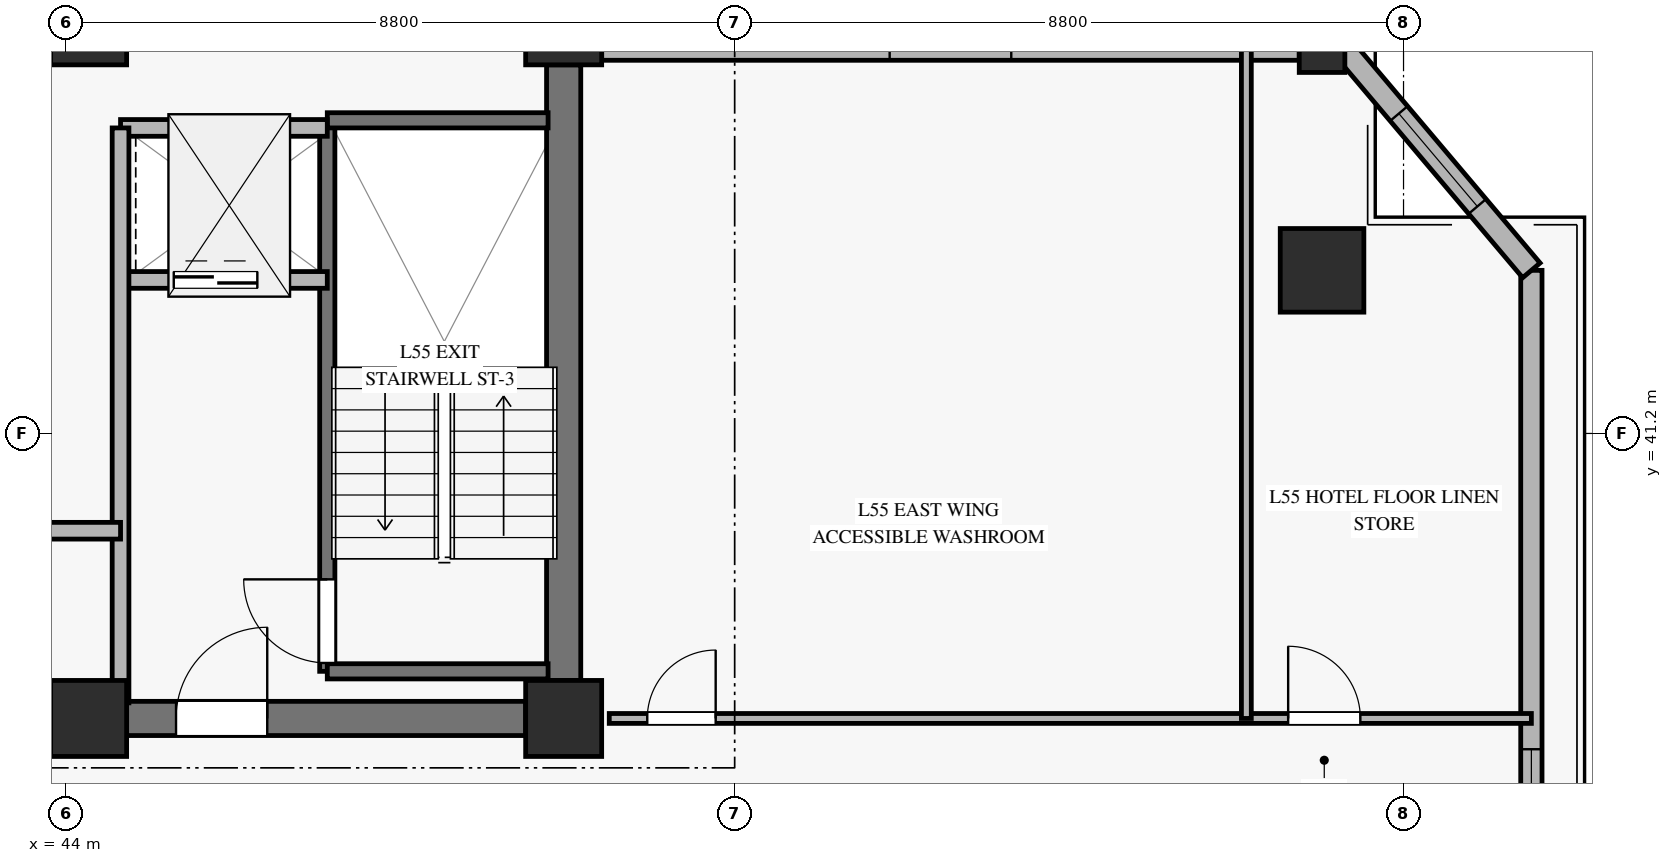
"""IFC4 building model, lengths in metres.
Left out: names, types, materials, properties, quantities, classifications, styles, units other than length and angle.
Written with IfcOpenShell. Run it as: python <this file> out.ifc"""

import sys

from ifc_helpers import new_model, si_unit, direction, frame, frame_2d, origin, origin_2d, place, context, subcontext, project, spatial, rectangle, hollow_rectangle, extrude, source, transform, mapped, element, fill, save


model = new_model("IFC4")
c1 = context("Model", 3, precision=1e-05, world=origin(), true_north=direction((0.0, 1.0)))
c2 = subcontext(c1, "Body", "Model", "MODEL_VIEW")
j1 = project(units=[si_unit("LENGTHUNIT", "METRE"), si_unit("PLANEANGLEUNIT", "RADIAN")], contexts=[c1])
p1 = place(None, origin())
s1 = spatial("IfcSite", under=j1, at=p1, CompositionType="ELEMENT")
p2 = place(p1, origin())
s2 = spatial("IfcBuilding", under=s1, at=p2, CompositionType="ELEMENT")
p3 = place(p2, frame((0.0, 0.0, 216.7)))
s3 = spatial("IfcBuildingStorey", under=s2, at=p3, CompositionType="ELEMENT", Elevation=216.7)
m1 = source(origin(), c2, "Body", "SweptSolid", [
    extrude(rectangle(XDim=1.0, YDim=1.0, at=origin_2d()), origin(), (0.0, 0.0, 1.0), 3.24),
])
for number, where, z_axis, x_axis in (
    (1, (44.3, 37.45, 0.0), (0.0, 0.0, 1.0), (1.0, 0.0, 0.0)),
    (2, (44.3, 46.55, 0.0), (0.0, 0.0, 1.0), (1.0, 0.0, 0.0)),
    (3, (50.55, 37.45, 0.0), (0.0, 0.0, 1.0), (1.0, 0.0, 0.0)),
    (4, (50.55, 46.55, 0.0), (0.0, 0.0, 1.0), (1.0, 0.0, 0.0)),
):
    element("IfcColumn", number, at=place(p3, frame(where, z_axis=z_axis, x_axis=x_axis)), inside=s3, PredefinedType="PILASTER", context=c2, shape_type="MappedRepresentation", body=[
        mapped(m1, transform((0.0, 0.0, 0.0), x_axis=(1.0, 0.0, 0.0), y_axis=(0.0, 1.0, 0.0), z_axis=(0.0, 0.0, 1.0), scale=1.0)),
    ])
p4 = place(p3, frame((44.8, 37.45, 0.0), z_axis=(0.0, 0.0, 1.0), x_axis=(1.0, 0.0, 0.0)))
e5 = element("IfcWall", 5, at=p4, inside=s3, PredefinedType="SHEAR", context=c2, shape_type="SweptSolid", body=[
    extrude(rectangle(XDim=5.25, YDim=0.45, at=frame_2d((2.625, 0.0))), origin(), (0.0, 0.0, 1.0), 3.24),
])
p5 = place(p4, frame((0.65, 0.0, 0.0)))
e6 = element("IfcOpeningElement", 6, at=p5, cuts=e5, PredefinedType="OPENING", context=c2, shape_type="SweptSolid", body=[
    extrude(rectangle(XDim=1.2, YDim=2.15, at=frame_2d((0.6, 1.075))), frame((0.0, 0.235, 0.0), z_axis=(0.0, -1.0, 0.0), x_axis=(1.0, 0.0, 0.0)), (0.0, 0.0, 1.0), 0.47),
])
p6 = place(p3, frame((50.55, 37.95, 0.0), z_axis=(0.0, 0.0, 1.0), x_axis=(0.0, 1.0, 0.0)))
e7 = element("IfcWall", 7, at=p6, inside=s3, PredefinedType="SHEAR", context=c2, shape_type="SweptSolid", body=[
    extrude(rectangle(XDim=8.1, YDim=0.45, at=frame_2d((4.05, 0.0))), origin(), (0.0, 0.0, 1.0), 3.24),
])
m2 = source(origin(), c2, "Body", "SweptSolid", [
    extrude(hollow_rectangle(XDim=1.1, YDim=1.1, WallThickness=0.05, at=origin_2d()), origin(), (0.0, 0.0, 1.0), 3.24),
])
p7 = place(p3, frame((60.528, 43.346, 0.0), z_axis=(0.0, 0.0, 1.0), x_axis=(1.0, 0.0, 0.0)))
e8 = element("IfcColumn", 8, at=p7, inside=s3, PredefinedType="COLUMN", context=c2, shape_type="MappedRepresentation", body=[
    mapped(m2, transform((0.0, 0.0, 0.0), x_axis=(1.0, 0.0, 0.0), y_axis=(0.0, 1.0, 0.0), z_axis=(0.0, 0.0, 1.0), scale=1.0)),
])
m3 = source(origin(), c2, "Body", "SweptSolid", [
    extrude(hollow_rectangle(XDim=0.6, YDim=0.6, WallThickness=0.028, at=origin_2d()), origin(), (0.0, 0.0, 1.0), 3.24),
])
p8 = place(p3, frame((60.528, 46.25, 0.0), z_axis=(0.0, 0.0, 1.0), x_axis=(1.0, 0.0, 0.0)))
e9 = element("IfcColumn", 9, at=p8, inside=s3, PredefinedType="COLUMN", context=c2, shape_type="MappedRepresentation", body=[
    mapped(m3, transform((0.0, 0.0, 0.0), x_axis=(1.0, 0.0, 0.0), y_axis=(0.0, 1.0, 0.0), z_axis=(0.0, 0.0, 1.0), scale=1.0)),
])
p9 = place(p3, frame((63.282, 29.509, 0.0), z_axis=(0.0, 0.0, 1.0), x_axis=(0.0, 1.0, 0.0)))
e10 = element("IfcWall", 10, at=p9, inside=s3, PredefinedType="SOLIDWALL", context=c2, shape_type="SweptSolid", body=[
    extrude(rectangle(XDim=13.837, YDim=0.28, at=frame_2d((6.918, 0.0))), origin(), (0.0, 0.0, 1.0), 2.72),
])
p10 = place(p9, frame((5.536, 0.0, 0.45)))
e11 = element("IfcOpeningElement", 11, at=p10, cuts=e10, PredefinedType="OPENING", context=c2, shape_type="SweptSolid", body=[
    extrude(rectangle(XDim=2.0, YDim=2.0, at=frame_2d((1.0, 1.0))), frame((0.0, 0.15, 0.0), z_axis=(0.0, -1.0, 0.0), x_axis=(1.0, 0.0, 0.0)), (0.0, 0.0, 1.0), 0.3),
])
p11 = place(p3, frame((51.05, 46.25, 0.0), z_axis=(0.0, 0.0, 1.0), x_axis=(1.0, 0.0, 0.0)))
e12 = element("IfcWall", 12, at=p11, inside=s3, PredefinedType="SOLIDWALL", context=c2, shape_type="SweptSolid", body=[
    extrude(rectangle(XDim=9.178, YDim=0.28, at=frame_2d((4.589, 0.0))), origin(), (0.0, 0.0, 1.0), 2.72),
])
p12 = place(p11, frame((3.789, 0.0, 0.45)))
e13 = element("IfcOpeningElement", 13, at=p12, cuts=e12, PredefinedType="OPENING", context=c2, shape_type="SweptSolid", body=[
    extrude(rectangle(XDim=1.6, YDim=2.0, at=frame_2d((0.8, 1.0))), frame((0.0, 0.15, 0.0), z_axis=(0.0, -1.0, 0.0), x_axis=(1.0, 0.0, 0.0)), (0.0, 0.0, 1.0), 0.3),
])
p13 = place(p3, frame((63.282, 43.346, 0.0), z_axis=(0.0, 0.0, 1.0), x_axis=(-0.645455651603, 0.763797749286, 0.0)))
e14 = element("IfcWall", 14, at=p13, inside=s3, PredefinedType="SOLIDWALL", context=c2, shape_type="SweptSolid", body=[
    extrude(rectangle(XDim=3.802, YDim=0.3, at=frame_2d((1.901, 0.0))), origin(), (0.0, 0.0, 1.0), 2.72),
])
p14 = place(p13, frame((1.101, 0.0, 0.45)))
e15 = element("IfcOpeningElement", 15, at=p14, cuts=e14, PredefinedType="OPENING", context=c2, shape_type="SweptSolid", body=[
    extrude(rectangle(XDim=1.6, YDim=2.0, at=frame_2d((0.8, 1.0))), frame((0.0, 0.16, 0.0), z_axis=(0.0, -1.0, 0.0), x_axis=(1.0, 0.0, 0.0)), (0.0, 0.0, 1.0), 0.32),
])
p15 = place(p3, frame((47.44, 38.07, 0.0), z_axis=(0.0, 0.0, 1.0), x_axis=(0.0, 1.0, 0.0)))
e16 = element("IfcWall", 16, at=p15, inside=s3, PredefinedType="SOLIDWALL", context=c2, shape_type="SweptSolid", body=[
    extrude(rectangle(XDim=7.25, YDim=0.2, at=frame_2d((3.625, 0.0))), origin(), (0.0, 0.0, 1.0), 3.5),
])
p16 = place(p15, frame((0.11, 0.0, 0.0)))
e17 = element("IfcOpeningElement", 17, at=p16, cuts=e16, PredefinedType="OPENING", context=c2, shape_type="SweptSolid", body=[
    extrude(rectangle(XDim=1.1, YDim=2.15, at=frame_2d((0.55, 1.075))), frame((0.0, 0.11, 0.0), z_axis=(0.0, -1.0, 0.0), x_axis=(1.0, 0.0, 0.0)), (0.0, 0.0, 1.0), 0.22),
])
for number, where, z_axis, x_axis in (
    (18, (47.44, 45.32, 0.0), (0.0, 0.0, 1.0), (1.0, 0.0, 0.0)),
    (19, (47.44, 38.07, 0.0), (0.0, 0.0, 1.0), (1.0, 0.0, 0.0)),
):
    element("IfcWall", number, at=place(p3, frame(where, z_axis=z_axis, x_axis=x_axis)), inside=s3, PredefinedType="SOLIDWALL", context=c2, shape_type="SweptSolid", body=[
        extrude(rectangle(XDim=2.905, YDim=0.2, at=frame_2d((1.453, 0.0))), origin(), (0.0, 0.0, 1.0), 3.5),
    ])
p17 = place(p3, frame((44.72, 43.22, 0.0), z_axis=(0.0, 0.0, 1.0), x_axis=(1.0, 0.0, 0.0)))
e20 = element("IfcWall", 20, at=p17, inside=s3, PredefinedType="SOLIDWALL", context=c2, shape_type="SweptSolid", body=[
    extrude(rectangle(XDim=2.72, YDim=0.22, at=frame_2d((1.36, 0.0))), origin(), (0.0, 0.0, 1.0), 3.24),
])
p18 = place(p17, frame((0.7, 0.0, 0.0)))
e21 = element("IfcOpeningElement", 21, at=p18, cuts=e20, PredefinedType="OPENING", context=c2, shape_type="SweptSolid", body=[
    extrude(rectangle(XDim=1.1, YDim=2.2, at=frame_2d((0.55, 1.1))), frame((0.0, 0.12, 0.0), z_axis=(0.0, -1.0, 0.0), x_axis=(1.0, 0.0, 0.0)), (0.0, 0.0, 1.0), 0.24),
])
p19 = place(p3, frame((44.72, 45.22, 0.0), z_axis=(0.0, 0.0, 1.0), x_axis=(1.0, 0.0, 0.0)))
e22 = element("IfcWall", 22, at=p19, inside=s3, PredefinedType="SOLIDWALL", context=c2, shape_type="SweptSolid", body=[
    extrude(rectangle(XDim=2.72, YDim=0.22, at=frame_2d((1.36, 0.0))), origin(), (0.0, 0.0, 1.0), 3.24),
])
p20 = place(p3, frame((44.72, 37.655, 0.0), z_axis=(0.0, 0.0, 1.0), x_axis=(0.0, 1.0, 0.0)))
e23 = element("IfcWall", 23, at=p20, inside=s3, PredefinedType="SOLIDWALL", context=c2, shape_type="SweptSolid", body=[
    extrude(rectangle(XDim=7.565, YDim=0.22, at=frame_2d((3.782, 0.0))), origin(), (0.0, 0.0, 1.0), 3.24),
])
p21 = place(p3, frame((36.12, 39.92, 0.0), z_axis=(0.0, 0.0, 1.0), x_axis=(1.0, 0.0, 0.0)))
e24 = element("IfcWall", 24, at=p21, inside=s3, PredefinedType="SOLIDWALL", context=c2, shape_type="SweptSolid", body=[
    extrude(rectangle(XDim=8.6, YDim=0.22, at=frame_2d((4.3, 0.0))), origin(), (0.0, 0.0, 1.0), 2.525),
])
p22 = place(p3, frame((51.15, 37.45, 0.0), z_axis=(0.0, 0.0, 1.0), x_axis=(1.0, 0.0, 0.0)))
e25 = element("IfcWall", 25, at=p22, inside=s3, PredefinedType="PARTITIONING", context=c2, shape_type="SweptSolid", body=[
    extrude(rectangle(XDim=12.132, YDim=0.13, at=frame_2d((6.066, 0.0))), origin(), (0.0, 0.0, 1.0), 2.725),
])
p23 = place(p22, frame((0.5, 0.0, 0.0)))
e26 = element("IfcOpeningElement", 26, at=p23, cuts=e25, PredefinedType="OPENING", context=c2, shape_type="SweptSolid", body=[
    extrude(rectangle(XDim=0.9, YDim=2.1, at=frame_2d((0.45, 1.05))), frame((0.0, 0.075, 0.0), z_axis=(0.0, -1.0, 0.0), x_axis=(1.0, 0.0, 0.0)), (0.0, 0.0, 1.0), 0.15),
])
p24 = place(p22, frame((8.932, 0.0, 0.0)))
e27 = element("IfcOpeningElement", 27, at=p24, cuts=e25, PredefinedType="OPENING", context=c2, shape_type="SweptSolid", body=[
    extrude(rectangle(XDim=0.95, YDim=2.1, at=frame_2d((0.475, 1.05))), frame((0.0, 0.075, 0.0), z_axis=(0.0, -1.0, 0.0), x_axis=(1.0, 0.0, 0.0)), (0.0, 0.0, 1.0), 0.15),
])
p25 = place(p3, frame((59.532, 37.45, 0.0), z_axis=(0.0, 0.0, 1.0), x_axis=(0.0, 1.0, 0.0)))
e28 = element("IfcWall", 28, at=p25, inside=s3, PredefinedType="PARTITIONING", context=c2, shape_type="SweptSolid", body=[
    extrude(rectangle(XDim=8.8, YDim=0.13, at=frame_2d((4.4, 0.0))), origin(), (0.0, 0.0, 1.0), 2.725),
])
m4 = source(origin(), c2, "Body", "SweptSolid", [
    extrude(rectangle(XDim=2.0, YDim=2.0, at=frame_2d((1.0, 1.0))), frame((0.0, 0.03, 0.0), z_axis=(0.0, -1.0, 0.0), x_axis=(1.0, 0.0, 0.0)), (0.0, 0.0, 1.0), 0.06),
])
p26 = place(p10, origin())
e29 = element("IfcWindow", 29, at=p26, inside=s3, PartitioningType="SINGLE_PANEL", PredefinedType="WINDOW", context=c2, shape_type="MappedRepresentation", body=[
    mapped(m4, transform((0.0, 0.0, 0.0), x_axis=(1.0, 0.0, 0.0), y_axis=(0.0, 1.0, 0.0), z_axis=(0.0, 0.0, 1.0), scale=1.0)),
])
fill(e11, e29)
m5 = source(origin(), c2, "Body", "SweptSolid", [
    extrude(rectangle(XDim=1.6, YDim=2.0, at=frame_2d((0.8, 1.0))), frame((0.0, 0.03, 0.0), z_axis=(0.0, -1.0, 0.0), x_axis=(1.0, 0.0, 0.0)), (0.0, 0.0, 1.0), 0.06),
])
p27 = place(p14, origin())
e30 = element("IfcWindow", 30, at=p27, inside=s3, PartitioningType="SINGLE_PANEL", PredefinedType="WINDOW", context=c2, shape_type="MappedRepresentation", body=[
    mapped(m5, transform((0.0, 0.0, 0.0), x_axis=(1.0, 0.0, 0.0), y_axis=(0.0, 1.0, 0.0), z_axis=(0.0, 0.0, 1.0), scale=1.0)),
])
fill(e15, e30)
m6 = source(origin(), c2, "Body", "SweptSolid", [
    extrude(rectangle(XDim=1.1, YDim=2.15, at=frame_2d((0.55, 1.075))), frame((0.0, 0.025, 0.0), z_axis=(0.0, -1.0, 0.0), x_axis=(1.0, 0.0, 0.0)), (0.0, 0.0, 1.0), 0.05),
])
p28 = place(p16, origin())
e31 = element("IfcDoor", 31, at=p28, inside=s3, OperationType="SINGLE_SWING_RIGHT", PredefinedType="DOOR", context=c2, shape_type="MappedRepresentation", body=[
    mapped(m6, transform((0.0, 0.0, 0.0), x_axis=(1.0, 0.0, 0.0), y_axis=(0.0, 1.0, 0.0), z_axis=(0.0, 0.0, 1.0), scale=1.0)),
])
fill(e17, e31)
m7 = source(origin(), c2, "Body", "SweptSolid", [
    extrude(rectangle(XDim=1.1, YDim=2.2, at=frame_2d((0.55, 1.1))), frame((0.0, 0.025, 0.0), z_axis=(0.0, -1.0, 0.0), x_axis=(1.0, 0.0, 0.0)), (0.0, 0.0, 1.0), 0.05),
])
p29 = place(p18, origin())
e32 = element("IfcDoor", 32, at=p29, inside=s3, OperationType="SLIDING_TO_LEFT", PredefinedType="DOOR", context=c2, shape_type="MappedRepresentation", body=[
    mapped(m7, transform((0.0, 0.0, 0.0), x_axis=(1.0, 0.0, 0.0), y_axis=(0.0, 1.0, 0.0), z_axis=(0.0, 0.0, 1.0), scale=1.0)),
])
fill(e21, e32)
m8 = source(origin(), c2, "Body", "SweptSolid", [
    extrude(rectangle(XDim=1.2, YDim=2.15, at=frame_2d((0.6, 1.075))), frame((0.0, 0.025, 0.0), z_axis=(0.0, -1.0, 0.0), x_axis=(1.0, 0.0, 0.0)), (0.0, 0.0, 1.0), 0.05),
])
p30 = place(p5, origin())
e33 = element("IfcDoor", 33, at=p30, inside=s3, OperationType="SINGLE_SWING_RIGHT", PredefinedType="DOOR", context=c2, shape_type="MappedRepresentation", body=[
    mapped(m8, transform((0.0, 0.0, 0.0), x_axis=(1.0, 0.0, 0.0), y_axis=(0.0, 1.0, 0.0), z_axis=(0.0, 0.0, 1.0), scale=1.0)),
])
fill(e6, e33)
m9 = source(origin(), c2, "Body", "SweptSolid", [
    extrude(rectangle(XDim=0.9, YDim=2.1, at=frame_2d((0.45, 1.05))), frame((0.0, 0.025, 0.0), z_axis=(0.0, -1.0, 0.0), x_axis=(1.0, 0.0, 0.0)), (0.0, 0.0, 1.0), 0.05),
])
p31 = place(p23, origin())
e34 = element("IfcDoor", 34, at=p31, inside=s3, OperationType="SINGLE_SWING_RIGHT", PredefinedType="DOOR", context=c2, shape_type="MappedRepresentation", body=[
    mapped(m9, transform((0.0, 0.0, 0.0), x_axis=(1.0, 0.0, 0.0), y_axis=(0.0, 1.0, 0.0), z_axis=(0.0, 0.0, 1.0), scale=1.0)),
])
fill(e26, e34)
m10 = source(origin(), c2, "Body", "SweptSolid", [
    extrude(rectangle(XDim=0.95, YDim=2.1, at=frame_2d((0.475, 1.05))), frame((0.0, 0.025, 0.0), z_axis=(0.0, -1.0, 0.0), x_axis=(1.0, 0.0, 0.0)), (0.0, 0.0, 1.0), 0.05),
])
p32 = place(p24, origin())
e35 = element("IfcDoor", 35, at=p32, inside=s3, OperationType="SINGLE_SWING_LEFT", PredefinedType="DOOR", context=c2, shape_type="MappedRepresentation", body=[
    mapped(m10, transform((0.0, 0.0, 0.0), x_axis=(1.0, 0.0, 0.0), y_axis=(0.0, 1.0, 0.0), z_axis=(0.0, 0.0, 1.0), scale=1.0)),
])
fill(e27, e35)
save(model, sys.argv[1])
